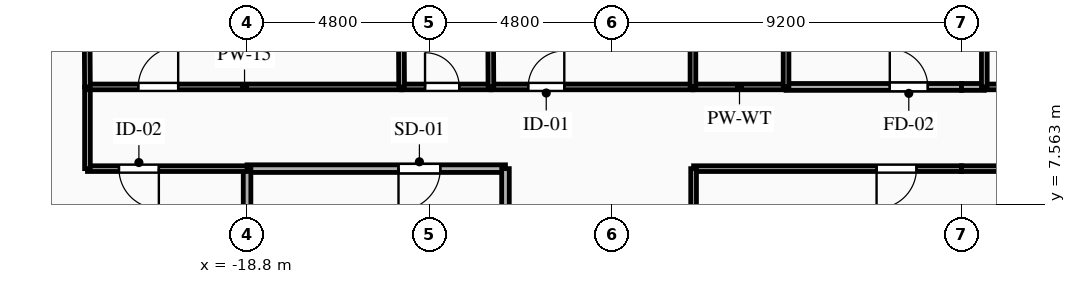
"""IFC4 building model, lengths in metres.
Left out: names, types, materials, properties, quantities, classifications, styles, units other than length and angle.
Written with IfcOpenShell. Run it as: python <this file> out.ifc"""

import sys

from ifc_helpers import new_model, si_unit, direction, frame, frame_2d, origin, place, context, subcontext, project, spatial, rectangle, extrude, element, fill, save


model = new_model("IFC4")
c1 = context("Model", 3, precision=1e-05, world=origin(), true_north=direction((0.0, 1.0)))
c2 = subcontext(c1, "Body", "Model", "MODEL_VIEW")
j1 = project(units=[si_unit("LENGTHUNIT", "METRE"), si_unit("PLANEANGLEUNIT", "RADIAN")], contexts=[c1])
p1 = place(None, origin())
s1 = spatial("IfcSite", under=j1, at=p1, CompositionType="ELEMENT")
p2 = place(p1, origin())
s2 = spatial("IfcBuilding", under=s1, at=p2, CompositionType="ELEMENT")
p3 = place(p2, frame((0.0, 0.0, 122.55)))
s3 = spatial("IfcBuildingStorey", under=s2, at=p3, CompositionType="ELEMENT", Elevation=122.55)
p4 = place(p3, frame((-12.0, 8.5, 0.0), z_axis=(0.0, 0.0, 1.0), x_axis=(-1.0, 0.0, 0.0)))
e1 = element("IfcWall", 1, at=p4, inside=s3, PredefinedType="PARTITIONING", context=c2, shape_type="SweptSolid", body=[
    extrude(rectangle(XDim=6.8, YDim=0.2, at=frame_2d((3.4, 0.0))), origin(), (0.0, 0.0, 1.0), 3.0),
])
p5 = place(p4, frame((1.715, 0.0, 0.0)))
e2 = element("IfcOpeningElement", 2, at=p5, cuts=e1, PredefinedType="OPENING", context=c2, shape_type="SweptSolid", body=[
    extrude(rectangle(XDim=1.1, YDim=2.15, at=frame_2d((0.55, 1.075))), frame((0.0, 0.11, 0.0), z_axis=(0.0, -1.0, 0.0), x_axis=(1.0, 0.0, 0.0)), (0.0, 0.0, 1.0), 0.22),
])
p6 = place(p3, frame((-12.0, 5.6, 0.0), z_axis=(0.0, 0.0, 1.0), x_axis=(0.0, 1.0, 0.0)))
e3 = element("IfcWall", 3, at=p6, inside=s3, PredefinedType="PARTITIONING", context=c2, shape_type="SweptSolid", body=[
    extrude(rectangle(XDim=2.9, YDim=0.2, at=frame_2d((1.45, 0.0))), origin(), (0.0, 0.0, 1.0), 3.0),
])
p7 = place(p3, frame((-18.8, 8.5, 0.0), z_axis=(0.0, 0.0, 1.0), x_axis=(0.0, -1.0, 0.0)))
e4 = element("IfcWall", 4, at=p7, inside=s3, PredefinedType="PARTITIONING", context=c2, shape_type="SweptSolid", body=[
    extrude(rectangle(XDim=2.9, YDim=0.2, at=frame_2d((1.45, 0.0))), origin(), (0.0, 0.0, 1.0), 2.485),
])
p8 = place(p3, frame((-18.8, 8.5, 0.0), z_axis=(0.0, 0.0, 1.0), x_axis=(-1.0, 0.0, 0.0)))
e5 = element("IfcWall", 5, at=p8, inside=s3, PredefinedType="PARTITIONING", context=c2, shape_type="SweptSolid", body=[
    extrude(rectangle(XDim=4.2, YDim=0.15, at=frame_2d((2.1, 0.0))), origin(), (0.0, 0.0, 1.0), 3.0),
])
p9 = place(p8, frame((2.321, 0.0, 0.0)))
e6 = element("IfcOpeningElement", 6, at=p9, cuts=e5, PredefinedType="OPENING", context=c2, shape_type="SweptSolid", body=[
    extrude(rectangle(XDim=1.05, YDim=2.15, at=frame_2d((0.525, 1.075))), frame((0.0, 0.085, 0.0), z_axis=(0.0, -1.0, 0.0), x_axis=(1.0, 0.0, 0.0)), (0.0, 0.0, 1.0), 0.17),
])
p10 = place(p3, frame((-23.0, 8.5, 0.0), z_axis=(0.0, 0.0, 1.0), x_axis=(0.0, 1.0, 0.0)))
e7 = element("IfcWall", 7, at=p10, inside=s3, PredefinedType="PARTITIONING", context=c2, shape_type="SweptSolid", body=[
    extrude(rectangle(XDim=2.15, YDim=0.15, at=frame_2d((1.075, 0.0))), origin(), (0.0, 0.0, 1.0), 3.0),
])
p11 = place(p3, frame((-23.0, 10.65, 0.0), z_axis=(0.0, 0.0, 1.0), x_axis=(1.0, 0.0, 0.0)))
e8 = element("IfcWall", 8, at=p11, inside=s3, PredefinedType="PARTITIONING", context=c2, shape_type="SweptSolid", body=[
    extrude(rectangle(XDim=8.267, YDim=0.15, at=frame_2d((4.134, 0.0))), origin(), (0.0, 0.0, 1.0), 3.0),
])
p12 = place(p11, frame((1.337, 0.0, 0.0)))
e9 = element("IfcOpeningElement", 9, at=p12, cuts=e8, PredefinedType="OPENING", context=c2, shape_type="SweptSolid", body=[
    extrude(rectangle(XDim=1.05, YDim=2.15, at=frame_2d((0.525, 1.075))), frame((0.0, 0.085, 0.0), z_axis=(0.0, -1.0, 0.0), x_axis=(1.0, 0.0, 0.0)), (0.0, 0.0, 1.0), 0.17),
])
p13 = place(p3, frame((-14.733, 10.65, 0.0), z_axis=(0.0, 0.0, 1.0), x_axis=(1.0, 0.0, 0.0)))
e10 = element("IfcWall", 10, at=p13, inside=s3, PredefinedType="PLUMBINGWALL", context=c2, shape_type="SweptSolid", body=[
    extrude(rectangle(XDim=2.35, YDim=0.15, at=frame_2d((1.175, 0.0))), origin(), (0.0, 0.0, 1.0), 3.0),
])
p14 = place(p13, frame((0.616, 0.0, 0.0)))
e11 = element("IfcOpeningElement", 11, at=p14, cuts=e10, PredefinedType="OPENING", context=c2, shape_type="SweptSolid", body=[
    extrude(rectangle(XDim=0.9, YDim=2.1, at=frame_2d((0.45, 1.05))), frame((0.0, 0.085, 0.0), z_axis=(0.0, -1.0, 0.0), x_axis=(1.0, 0.0, 0.0)), (0.0, 0.0, 1.0), 0.17),
])
p15 = place(p3, frame((-12.383, 10.65, 0.0), z_axis=(0.0, 0.0, 1.0), x_axis=(1.0, 0.0, 0.0)))
e12 = element("IfcWall", 12, at=p15, inside=s3, PredefinedType="PARTITIONING", context=c2, shape_type="SweptSolid", body=[
    extrude(rectangle(XDim=5.316, YDim=0.15, at=frame_2d((2.658, 0.0))), origin(), (0.0, 0.0, 1.0), 3.0),
])
p16 = place(p15, frame((0.981, 0.0, 0.0)))
e13 = element("IfcOpeningElement", 13, at=p16, cuts=e12, PredefinedType="OPENING", context=c2, shape_type="SweptSolid", body=[
    extrude(rectangle(XDim=0.95, YDim=2.1, at=frame_2d((0.475, 1.05))), frame((0.0, 0.085, 0.0), z_axis=(0.0, -1.0, 0.0), x_axis=(1.0, 0.0, 0.0)), (0.0, 0.0, 1.0), 0.17),
])
p17 = place(p3, frame((-4.617, 10.65, 0.0), z_axis=(0.0, 0.0, 1.0), x_axis=(1.0, 0.0, 0.0)))
e14 = element("IfcWall", 14, at=p17, inside=s3, PredefinedType="PARTITIONING", context=c2, shape_type="SweptSolid", body=[
    extrude(rectangle(XDim=4.617, YDim=0.18, at=frame_2d((2.309, 0.0))), origin(), (0.0, 0.0, 1.0), 3.0),
])
p18 = place(p17, frame((2.73, 0.0, 0.0)))
e15 = element("IfcOpeningElement", 15, at=p18, cuts=e14, PredefinedType="OPENING", context=c2, shape_type="SweptSolid", body=[
    extrude(rectangle(XDim=1.0, YDim=2.15, at=frame_2d((0.5, 1.075))), frame((0.0, 0.1, 0.0), z_axis=(0.0, -1.0, 0.0), x_axis=(1.0, 0.0, 0.0)), (0.0, 0.0, 1.0), 0.2),
])
p19 = place(p3, frame((-7.067, 10.65, 0.0), z_axis=(0.0, 0.0, 1.0), x_axis=(1.0, 0.0, 0.0)))
e16 = element("IfcWall", 16, at=p19, inside=s3, PredefinedType="PLUMBINGWALL", context=c2, shape_type="SweptSolid", body=[
    extrude(rectangle(XDim=2.45, YDim=0.15, at=frame_2d((1.225, 0.0))), origin(), (0.0, 0.0, 1.0), 3.0),
])
p20 = place(p3, frame((0.0, 8.5, 0.0), z_axis=(0.0, 0.0, 1.0), x_axis=(-1.0, 0.0, 0.0)))
e17 = element("IfcWall", 17, at=p20, inside=s3, PredefinedType="PARTITIONING", context=c2, shape_type="SweptSolid", body=[
    extrude(rectangle(XDim=7.05, YDim=0.15, at=frame_2d((3.525, 0.0))), origin(), (0.0, 0.0, 1.0), 3.0),
])
p21 = place(p20, frame((1.185, 0.0, 0.0)))
e18 = element("IfcOpeningElement", 18, at=p21, cuts=e17, PredefinedType="OPENING", context=c2, shape_type="SweptSolid", body=[
    extrude(rectangle(XDim=1.05, YDim=2.15, at=frame_2d((0.525, 1.075))), frame((0.0, 0.085, 0.0), z_axis=(0.0, -1.0, 0.0), x_axis=(1.0, 0.0, 0.0)), (0.0, 0.0, 1.0), 0.17),
])
p22 = place(p3, frame((0.0, 10.65, 0.0), z_axis=(0.0, 0.0, 1.0), x_axis=(1.0, 0.0, 0.0)))
e19 = element("IfcWall", 19, at=p22, inside=s3, PredefinedType="PARTITIONING", context=c2, shape_type="SweptSolid", body=[
    extrude(rectangle(XDim=0.6, YDim=0.18, at=frame_2d((0.3, 0.0))), origin(), (0.0, 0.0, 1.0), 3.0),
])
p23 = place(p3, frame((0.6, 10.65, 0.0), z_axis=(0.0, 0.0, 1.0), x_axis=(1.0, 0.0, 0.0)))
e20 = element("IfcWall", 20, at=p23, inside=s3, PredefinedType="PLUMBINGWALL", context=c2, shape_type="SweptSolid", body=[
    extrude(rectangle(XDim=2.45, YDim=0.15, at=frame_2d((1.225, 0.0))), origin(), (0.0, 0.0, 1.0), 3.0),
])
for number, where, z_axis, x_axis in (
    (21, (7.05, 8.5, 0.0), (0.0, 0.0, 1.0), (-1.0, 0.0, 0.0)),
    (22, (-7.05, 8.5, 0.0), (0.0, 0.0, 1.0), (0.0, -1.0, 0.0)),
):
    element("IfcWall", number, at=place(p3, frame(where, z_axis=z_axis, x_axis=x_axis)), inside=s3, PredefinedType="PARTITIONING", context=c2, shape_type="SweptSolid", body=[
        extrude(rectangle(XDim=7.05, YDim=0.15, at=frame_2d((3.525, 0.0))), origin(), (0.0, 0.0, 1.0), 3.0),
    ])
p24 = place(p3, frame((-23.044, 18.013, 0.0), z_axis=(0.0, 0.0, 1.0), x_axis=(0.005968459246, -0.999982188588, 0.0)))
e23 = element("IfcWall", 23, at=p24, inside=s3, PredefinedType="PARTITIONING", context=c2, shape_type="SweptSolid", body=[
    extrude(rectangle(XDim=7.363, YDim=0.15, at=frame_2d((3.682, 0.0))), origin(), (0.0, 0.0, 1.0), 3.0),
])
p25 = place(p3, frame((-14.777, 18.882, 0.0), z_axis=(0.0, 0.0, 1.0), x_axis=(0.005338477179, -0.999985750229, 0.0)))
e24 = element("IfcWall", 24, at=p25, inside=s3, PredefinedType="PLUMBINGWALL", context=c2, shape_type="SweptSolid", body=[
    extrude(rectangle(XDim=8.232, YDim=0.15, at=frame_2d((4.116, 0.0))), origin(), (0.0, 0.0, 1.0), 3.0),
])
p26 = place(p3, frame((-12.427, 19.129, 0.0), z_axis=(0.0, 0.0, 1.0), x_axis=(0.005182918666, -0.999986568587, 0.0)))
e25 = element("IfcWall", 25, at=p26, inside=s3, PredefinedType="PLUMBINGWALL", context=c2, shape_type="SweptSolid", body=[
    extrude(rectangle(XDim=8.479, YDim=0.15, at=frame_2d((4.239, 0.0))), origin(), (0.0, 0.0, 1.0), 3.0),
])
for number, where, z_axis, x_axis in (
    (26, (-7.067, 12.8, 0.0), (0.0, 0.0, 1.0), (0.0, -1.0, 0.0)),
    (27, (-4.617, 10.65, 0.0), (0.0, 0.0, 1.0), (0.0, 1.0, 0.0)),
    (28, (0.6, 12.8, 0.0), (0.0, 0.0, 1.0), (0.0, -1.0, 0.0)),
):
    element("IfcWall", number, at=place(p3, frame(where, z_axis=z_axis, x_axis=x_axis)), inside=s3, PredefinedType="PLUMBINGWALL", context=c2, shape_type="SweptSolid", body=[
        extrude(rectangle(XDim=2.15, YDim=0.15, at=frame_2d((1.075, 0.0))), origin(), (0.0, 0.0, 1.0), 3.0),
    ])
p27 = place(p5, origin())
e29 = element("IfcDoor", 29, at=p27, inside=s3, OperationType="SINGLE_SWING_RIGHT", PredefinedType="DOOR", context=c2, shape_type="SweptSolid", body=[
    extrude(rectangle(XDim=1.1, YDim=2.15, at=frame_2d((0.55, 1.075))), frame((0.0, 0.025, 0.0), z_axis=(0.0, -1.0, 0.0), x_axis=(1.0, 0.0, 0.0)), (0.0, 0.0, 1.0), 0.05),
])
fill(e2, e29)
p28 = place(p9, origin())
e30 = element("IfcDoor", 30, at=p28, inside=s3, OperationType="SINGLE_SWING_LEFT", PredefinedType="DOOR", context=c2, shape_type="SweptSolid", body=[
    extrude(rectangle(XDim=1.05, YDim=2.15, at=frame_2d((0.525, 1.075))), frame((0.0, 0.025, 0.0), z_axis=(0.0, -1.0, 0.0), x_axis=(1.0, 0.0, 0.0)), (0.0, 0.0, 1.0), 0.05),
])
fill(e6, e30)
p29 = place(p12, origin())
e31 = element("IfcDoor", 31, at=p29, inside=s3, OperationType="SINGLE_SWING_RIGHT", PredefinedType="DOOR", context=c2, shape_type="SweptSolid", body=[
    extrude(rectangle(XDim=1.05, YDim=2.15, at=frame_2d((0.525, 1.075))), frame((0.0, 0.025, 0.0), z_axis=(0.0, -1.0, 0.0), x_axis=(1.0, 0.0, 0.0)), (0.0, 0.0, 1.0), 0.05),
])
fill(e9, e31)
p30 = place(p14, origin())
e32 = element("IfcDoor", 32, at=p30, inside=s3, OperationType="SINGLE_SWING_LEFT", PredefinedType="DOOR", context=c2, shape_type="SweptSolid", body=[
    extrude(rectangle(XDim=0.9, YDim=2.1, at=frame_2d((0.45, 1.05))), frame((0.0, 0.025, 0.0), z_axis=(0.0, -1.0, 0.0), x_axis=(1.0, 0.0, 0.0)), (0.0, 0.0, 1.0), 0.05),
])
fill(e11, e32)
p31 = place(p16, origin())
e33 = element("IfcDoor", 33, at=p31, inside=s3, OperationType="SINGLE_SWING_RIGHT", PredefinedType="DOOR", context=c2, shape_type="SweptSolid", body=[
    extrude(rectangle(XDim=0.95, YDim=2.1, at=frame_2d((0.475, 1.05))), frame((0.0, 0.025, 0.0), z_axis=(0.0, -1.0, 0.0), x_axis=(1.0, 0.0, 0.0)), (0.0, 0.0, 1.0), 0.05),
])
fill(e13, e33)
p32 = place(p18, origin())
e34 = element("IfcDoor", 34, at=p32, inside=s3, OperationType="SINGLE_SWING_LEFT", PredefinedType="DOOR", context=c2, shape_type="SweptSolid", body=[
    extrude(rectangle(XDim=1.0, YDim=2.15, at=frame_2d((0.5, 1.075))), frame((0.0, 0.025, 0.0), z_axis=(0.0, -1.0, 0.0), x_axis=(1.0, 0.0, 0.0)), (0.0, 0.0, 1.0), 0.05),
])
fill(e15, e34)
p33 = place(p21, origin())
e35 = element("IfcDoor", 35, at=p33, inside=s3, OperationType="SINGLE_SWING_RIGHT", PredefinedType="DOOR", context=c2, shape_type="SweptSolid", body=[
    extrude(rectangle(XDim=1.05, YDim=2.15, at=frame_2d((0.525, 1.075))), frame((0.0, 0.025, 0.0), z_axis=(0.0, -1.0, 0.0), x_axis=(1.0, 0.0, 0.0)), (0.0, 0.0, 1.0), 0.05),
])
fill(e18, e35)
save(model, sys.argv[1])
